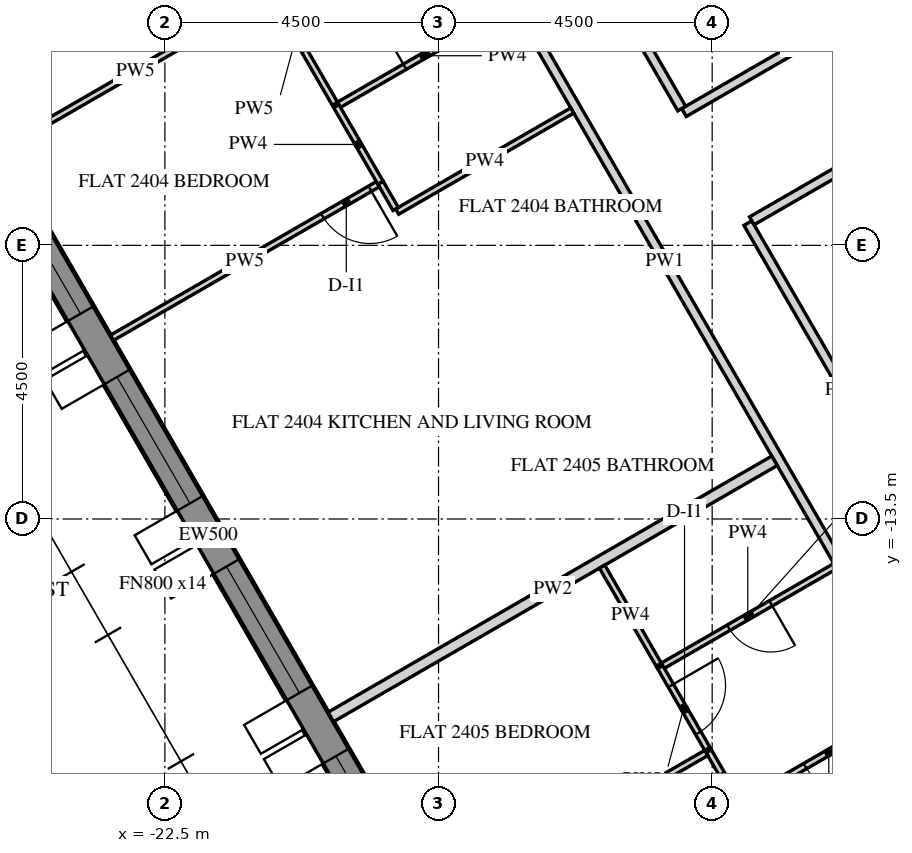
"""IFC4 building model, lengths in metres.
Left out: names, types, materials, properties, quantities, classifications, styles, units other than length and angle.
Written with IfcOpenShell. Run it as: python <this file> out.ifc"""

import sys

from ifc_helpers import new_model, si_unit, direction, frame, frame_2d, origin, place, context, subcontext, project, spatial, polyline, rectangle, outline, extrude, element, fill, save


model = new_model("IFC4")
c1 = context("Model", 3, precision=1e-05, world=origin(), true_north=direction((0.0, 1.0)))
c2 = subcontext(c1, "Body", "Model", "MODEL_VIEW")
j1 = project(units=[si_unit("LENGTHUNIT", "METRE"), si_unit("PLANEANGLEUNIT", "RADIAN")], contexts=[c1])
p1 = place(None, origin())
s1 = spatial("IfcSite", under=j1, at=p1, CompositionType="ELEMENT")
p2 = place(p1, origin())
s2 = spatial("IfcBuilding", under=s1, at=p2, CompositionType="ELEMENT")
p3 = place(p2, frame((0.0, 0.0, 303.0)))
s3 = spatial("IfcBuildingStorey", under=s2, at=p3, CompositionType="ELEMENT", Elevation=303.0)
p4 = place(p3, frame((-28.149, -2.745, -0.15), z_axis=(0.0, 0.0, 1.0), x_axis=(0.500003737743, -0.866023245787, 0.0)))
e1 = element("IfcWall", 1, at=p4, inside=s3, PredefinedType="SOLIDWALL", context=c2, shape_type="SweptSolid", body=[
    extrude(outline(polyline([(-0.021, -0.25), (25.468, -0.25), (25.421, 0.25), (0.021, 0.25), (-0.021, -0.25)])), origin(), (0.0, 0.0, 1.0), 3.9),
])
p5 = place(p4, frame((2.522, 0.0, 0.75)))
e2 = element("IfcOpeningElement", 2, at=p5, cuts=e1, PredefinedType="OPENING", context=c2, shape_type="SweptSolid", body=[
    extrude(rectangle(XDim=2.4, YDim=2.7, at=frame_2d((1.2, 1.35))), frame((0.0, 0.26, 0.0), z_axis=(0.0, -1.0, 0.0), x_axis=(1.0, 0.0, 0.0)), (0.0, 0.0, 1.0), 0.52),
])
p6 = place(p4, frame((6.122, 0.0, 0.75)))
e3 = element("IfcOpeningElement", 3, at=p6, cuts=e1, PredefinedType="OPENING", context=c2, shape_type="SweptSolid", body=[
    extrude(rectangle(XDim=2.4, YDim=2.7, at=frame_2d((1.2, 1.35))), frame((0.0, 0.26, 0.0), z_axis=(0.0, -1.0, 0.0), x_axis=(1.0, 0.0, 0.0)), (0.0, 0.0, 1.0), 0.52),
])
p7 = place(p4, frame((9.722, 0.0, 0.75)))
e4 = element("IfcOpeningElement", 4, at=p7, cuts=e1, PredefinedType="OPENING", context=c2, shape_type="SweptSolid", body=[
    extrude(rectangle(XDim=2.4, YDim=2.7, at=frame_2d((1.2, 1.35))), frame((0.0, 0.26, 0.0), z_axis=(0.0, -1.0, 0.0), x_axis=(1.0, 0.0, 0.0)), (0.0, 0.0, 1.0), 0.52),
])
p8 = place(p4, frame((13.323, 0.0, 0.75)))
e5 = element("IfcOpeningElement", 5, at=p8, cuts=e1, PredefinedType="OPENING", context=c2, shape_type="SweptSolid", body=[
    extrude(rectangle(XDim=2.4, YDim=2.7, at=frame_2d((1.2, 1.35))), frame((0.0, 0.26, 0.0), z_axis=(0.0, -1.0, 0.0), x_axis=(1.0, 0.0, 0.0)), (0.0, 0.0, 1.0), 0.52),
])
p9 = place(p4, frame((16.922, 0.0, 0.75)))
e6 = element("IfcOpeningElement", 6, at=p9, cuts=e1, PredefinedType="OPENING", context=c2, shape_type="SweptSolid", body=[
    extrude(rectangle(XDim=2.4, YDim=2.7, at=frame_2d((1.2, 1.35))), frame((0.0, 0.26, 0.0), z_axis=(0.0, -1.0, 0.0), x_axis=(1.0, 0.0, 0.0)), (0.0, 0.0, 1.0), 0.52),
])
p10 = place(p4, frame((20.522, 0.0, 0.75)))
e7 = element("IfcOpeningElement", 7, at=p10, cuts=e1, PredefinedType="OPENING", context=c2, shape_type="SweptSolid", body=[
    extrude(rectangle(XDim=2.4, YDim=2.7, at=frame_2d((1.2, 1.35))), frame((0.0, 0.26, 0.0), z_axis=(0.0, -1.0, 0.0), x_axis=(1.0, 0.0, 0.0)), (0.0, 0.0, 1.0), 0.52),
])
p11 = place(p3, frame((-12.471, 0.0, -0.15), z_axis=(0.0, 0.0, 1.0), x_axis=(0.499996419489, -0.866027470984, 0.0)))
e8 = element("IfcWall", 8, at=p11, inside=s3, PredefinedType="SHEAR", context=c2, shape_type="SweptSolid", body=[
    extrude(outline(polyline([(-0.115, -0.2), (12.586, -0.2), (12.355, 0.2), (0.115, 0.2), (-0.115, -0.2)])), origin(), (0.0, 0.0, 1.0), 3.9),
])
p12 = place(p11, frame((5.306, 0.0, 0.15)))
e9 = element("IfcOpeningElement", 9, at=p12, cuts=e8, PredefinedType="OPENING", context=c2, shape_type="SweptSolid", body=[
    extrude(rectangle(XDim=1.8, YDim=2.4, at=frame_2d((0.9, 1.2))), frame((0.0, 0.21, 0.0), z_axis=(0.0, -1.0, 0.0), x_axis=(1.0, 0.0, 0.0)), (0.0, 0.0, 1.0), 0.42),
])
p13 = place(p3, frame((-18.036, -2.761, 0.0), z_axis=(0.0, 0.0, 1.0), x_axis=(0.499996279807, -0.866027551628, 0.0)))
e10 = element("IfcWall", 10, at=p13, inside=s3, PredefinedType="PARTITIONING", context=c2, shape_type="SweptSolid", body=[
    extrude(rectangle(XDim=15.024, YDim=0.15, at=frame_2d((7.512, 0.0))), origin(), (0.0, 0.0, 1.0), 2.988),
])
p14 = place(p13, frame((0.8, 0.0, 0.0)))
e11 = element("IfcOpeningElement", 11, at=p14, cuts=e10, PredefinedType="OPENING", context=c2, shape_type="SweptSolid", body=[
    extrude(rectangle(XDim=1.0, YDim=2.1, at=frame_2d((0.5, 1.05))), frame((0.0, 0.085, 0.0), z_axis=(0.0, -1.0, 0.0), x_axis=(1.0, 0.0, 0.0)), (0.0, 0.0, 1.0), 0.17),
])
p15 = place(p13, frame((13.874, 0.0, 0.0)))
e12 = element("IfcOpeningElement", 12, at=p15, cuts=e10, PredefinedType="OPENING", context=c2, shape_type="SweptSolid", body=[
    extrude(rectangle(XDim=1.0, YDim=2.1, at=frame_2d((0.5, 1.05))), frame((0.0, 0.085, 0.0), z_axis=(0.0, -1.0, 0.0), x_axis=(1.0, 0.0, 0.0)), (0.0, 0.0, 1.0), 0.17),
])
p16 = place(p3, frame((-10.066, -4.566, 0.0), z_axis=(0.0, 0.0, 1.0), x_axis=(-0.866031096941, -0.499990139034, 0.0)))
e13 = element("IfcWall", 13, at=p16, inside=s3, PredefinedType="PARTITIONING", context=c2, shape_type="SweptSolid", body=[
    extrude(rectangle(XDim=4.5, YDim=0.15, at=frame_2d((2.25, 0.0))), origin(), (0.0, 0.0, 1.0), 2.988),
])
p17 = place(p3, frame((-14.0, -6.751, 0.0), z_axis=(0.0, 0.0, 1.0), x_axis=(-0.500008739126, 0.866020358189, 0.0)))
e14 = element("IfcWall", 14, at=p17, inside=s3, PredefinedType="PARTITIONING", context=c2, shape_type="SweptSolid", body=[
    extrude(rectangle(XDim=4.675, YDim=0.15, at=frame_2d((2.338, 0.0))), origin(), (0.0, 0.0, 1.0), 2.988),
])
p18 = place(p17, frame((1.888, 0.0, 0.0)))
e15 = element("IfcOpeningElement", 15, at=p18, cuts=e14, PredefinedType="OPENING", context=c2, shape_type="SweptSolid", body=[
    extrude(rectangle(XDim=0.9, YDim=2.1, at=frame_2d((0.45, 1.05))), frame((0.0, 0.085, 0.0), z_axis=(0.0, -1.0, 0.0), x_axis=(1.0, 0.0, 0.0)), (0.0, 0.0, 1.0), 0.17),
])
p19 = place(p3, frame((-9.735, -14.138, 0.0), z_axis=(0.0, 0.0, 1.0), x_axis=(-0.500018385592, 0.866014788598, 0.0)))
e16 = element("IfcWall", 16, at=p19, inside=s3, PredefinedType="PARTITIONING", context=c2, shape_type="SweptSolid", body=[
    extrude(rectangle(XDim=6.356, YDim=0.15, at=frame_2d((3.178, 0.0))), origin(), (0.0, 0.0, 1.0), 2.988),
])
p20 = place(p3, frame((-12.848, -8.597, 0.0), z_axis=(0.0, 0.0, 1.0), x_axis=(0.866017452598, 0.500013771606, 0.0)))
e17 = element("IfcWall", 17, at=p20, inside=s3, PredefinedType="PARTITIONING", context=c2, shape_type="SweptSolid", body=[
    extrude(rectangle(XDim=4.425, YDim=0.15, at=frame_2d((2.213, 0.0))), origin(), (0.0, 0.0, 1.0), 2.988),
])
p21 = place(p3, frame((-15.801, -6.782, 0.0), z_axis=(0.0, 0.0, 1.0), x_axis=(-0.866033959199, -0.499985181294, 0.0)))
e18 = element("IfcWall", 18, at=p21, inside=s3, PredefinedType="PARTITIONING", context=c2, shape_type="SweptSolid", body=[
    extrude(rectangle(XDim=3.325, YDim=0.1, at=frame_2d((1.662, 0.0))), origin(), (0.0, 0.0, 1.0), 2.988),
])
p22 = place(p3, frame((-18.705, -8.402, 0.0), z_axis=(0.0, 0.0, 1.0), x_axis=(-0.499863173377, 0.866104386261, 0.0)))
e19 = element("IfcWall", 19, at=p22, inside=s3, PredefinedType="PARTITIONING", context=c2, shape_type="SweptSolid", body=[
    extrude(rectangle(XDim=0.501, YDim=0.1, at=frame_2d((0.25, 0.0))), origin(), (0.0, 0.0, 1.0), 2.988),
])
p23 = place(p3, frame((-18.998, -7.995, 0.0), z_axis=(0.0, 0.0, 1.0), x_axis=(-0.866039067339, -0.499976333282, 0.0)))
e20 = element("IfcWall", 20, at=p23, inside=s3, PredefinedType="PARTITIONING", context=c2, shape_type="SweptSolid", body=[
    extrude(rectangle(XDim=5.05, YDim=0.1, at=frame_2d((2.525, 0.0))), origin(), (0.0, 0.0, 1.0), 2.988),
])
p24 = place(p23, frame((0.15, 0.0, 0.0)))
e21 = element("IfcOpeningElement", 21, at=p24, cuts=e20, PredefinedType="OPENING", context=c2, shape_type="SweptSolid", body=[
    extrude(rectangle(XDim=0.9, YDim=2.1, at=frame_2d((0.45, 1.05))), frame((0.0, 0.06, 0.0), z_axis=(0.0, -1.0, 0.0), x_axis=(1.0, 0.0, 0.0)), (0.0, 0.0, 1.0), 0.12),
])
p25 = place(p3, frame((-19.771, -16.755, 0.0), z_axis=(0.0, 0.0, 1.0), x_axis=(0.866026819143, 0.499997548519, 0.0)))
e22 = element("IfcWall", 22, at=p25, inside=s3, PredefinedType="PARTITIONING", context=c2, shape_type="SweptSolid", body=[
    extrude(rectangle(XDim=8.425, YDim=0.18, at=frame_2d((4.212, 0.0))), origin(), (0.0, 0.0, 1.0), 2.988),
])
p26 = place(p3, frame((-19.68, -6.713, 0.0), z_axis=(0.0, 0.0, 1.0), x_axis=(0.866002163101, 0.500040251884, 0.0)))
e23 = element("IfcWall", 23, at=p26, inside=s3, PredefinedType="PARTITIONING", context=c2, shape_type="SweptSolid", body=[
    extrude(rectangle(XDim=3.325, YDim=0.1, at=frame_2d((1.663, 0.0))), origin(), (0.0, 0.0, 1.0), 2.988),
])
p27 = place(p26, frame((1.3, 0.0, 0.0)))
e24 = element("IfcOpeningElement", 24, at=p27, cuts=e23, PredefinedType="OPENING", context=c2, shape_type="SweptSolid", body=[
    extrude(rectangle(XDim=0.8, YDim=2.1, at=frame_2d((0.4, 1.05))), frame((0.0, 0.06, 0.0), z_axis=(0.0, -1.0, 0.0), x_axis=(1.0, 0.0, 0.0)), (0.0, 0.0, 1.0), 0.12),
])
p28 = place(p3, frame((-20.981, -4.459, 0.0), z_axis=(0.0, 0.0, 1.0), x_axis=(0.500056202316, -0.865992952931, 0.0)))
e25 = element("IfcWall", 25, at=p28, inside=s3, PredefinedType="PARTITIONING", context=c2, shape_type="SweptSolid", body=[
    extrude(rectangle(XDim=2.554, YDim=0.1, at=frame_2d((1.277, 0.0))), origin(), (0.0, 0.0, 1.0), 2.988),
])
p29 = place(p28, frame((0.653, 0.0, 0.0)))
e26 = element("IfcOpeningElement", 26, at=p29, cuts=e25, PredefinedType="OPENING", context=c2, shape_type="SweptSolid", body=[
    extrude(rectangle(XDim=0.9, YDim=2.1, at=frame_2d((0.45, 1.05))), frame((0.0, 0.06, 0.0), z_axis=(0.0, -1.0, 0.0), x_axis=(1.0, 0.0, 0.0)), (0.0, 0.0, 1.0), 0.12),
])
p30 = place(p3, frame((-19.681, -6.711, 0.0), z_axis=(0.0, 0.0, 1.0), x_axis=(0.499969679245, -0.866042908773, 0.0)))
e27 = element("IfcWall", 27, at=p30, inside=s3, PredefinedType="PARTITIONING", context=c2, shape_type="SweptSolid", body=[
    extrude(rectangle(XDim=1.453, YDim=0.1, at=frame_2d((0.727, 0.0))), origin(), (0.0, 0.0, 1.0), 2.988),
])
p31 = place(p3, frame((-25.171, -7.402, 0.0), z_axis=(0.0, 0.0, 1.0), x_axis=(0.866026981659, 0.499997267031, 0.0)))
e28 = element("IfcWall", 28, at=p31, inside=s3, PredefinedType="PARTITIONING", context=c2, shape_type="SweptSolid", body=[
    extrude(rectangle(XDim=5.05, YDim=0.1, at=frame_2d((2.525, 0.0))), origin(), (0.0, 0.0, 1.0), 2.988),
])
p32 = place(p31, frame((4.0, 0.0, 0.0)))
e29 = element("IfcOpeningElement", 29, at=p32, cuts=e28, PredefinedType="OPENING", context=c2, shape_type="SweptSolid", body=[
    extrude(rectangle(XDim=0.9, YDim=2.1, at=frame_2d((0.45, 1.05))), frame((0.0, 0.06, 0.0), z_axis=(0.0, -1.0, 0.0), x_axis=(1.0, 0.0, 0.0)), (0.0, 0.0, 1.0), 0.12),
])
p33 = place(p3, frame((-8.789, -15.726, 0.0), z_axis=(0.0, 0.0, 1.0), x_axis=(-0.866010575439, -0.500025682568, 0.0)))
e30 = element("IfcWall", 30, at=p33, inside=s3, PredefinedType="PARTITIONING", context=c2, shape_type="SweptSolid", body=[
    extrude(rectangle(XDim=4.925, YDim=0.1, at=frame_2d((2.462, 0.0))), origin(), (0.0, 0.0, 1.0), 2.988),
])
p34 = place(p33, frame((2.775, 0.0, 0.0)))
e31 = element("IfcOpeningElement", 31, at=p34, cuts=e30, PredefinedType="OPENING", context=c2, shape_type="SweptSolid", body=[
    extrude(rectangle(XDim=0.9, YDim=2.1, at=frame_2d((0.45, 1.05))), frame((0.0, 0.06, 0.0), z_axis=(0.0, -1.0, 0.0), x_axis=(1.0, 0.0, 0.0)), (0.0, 0.0, 1.0), 0.12),
])
p35 = place(p3, frame((-13.08, -18.146, 0.0), z_axis=(0.0, 0.0, 1.0), x_axis=(-0.49986306505, 0.866104448781, 0.0)))
e32 = element("IfcWall", 32, at=p35, inside=s3, PredefinedType="PARTITIONING", context=c2, shape_type="SweptSolid", body=[
    extrude(rectangle(XDim=0.952, YDim=0.1, at=frame_2d((0.476, 0.0))), origin(), (0.0, 0.0, 1.0), 2.988),
])
p36 = place(p3, frame((-13.598, -17.348, 0.0), z_axis=(0.0, 0.0, 1.0), x_axis=(-0.866026981659, -0.499997267031, 0.0)))
e33 = element("IfcWall", 33, at=p36, inside=s3, PredefinedType="PARTITIONING", context=c2, shape_type="SweptSolid", body=[
    extrude(rectangle(XDim=5.05, YDim=0.1, at=frame_2d((2.525, 0.0))), origin(), (0.0, 0.0, 1.0), 2.988),
])
p37 = place(p3, frame((-11.475, -14.275, 0.0), z_axis=(0.0, 0.0, 1.0), x_axis=(-0.866002163101, -0.500040251884, 0.0)))
e34 = element("IfcWall", 34, at=p37, inside=s3, PredefinedType="PARTITIONING", context=c2, shape_type="SweptSolid", body=[
    extrude(rectangle(XDim=3.325, YDim=0.1, at=frame_2d((1.663, 0.0))), origin(), (0.0, 0.0, 1.0), 2.988),
])
p38 = place(p37, frame((1.225, 0.0, 0.0)))
e35 = element("IfcOpeningElement", 35, at=p38, cuts=e34, PredefinedType="OPENING", context=c2, shape_type="SweptSolid", body=[
    extrude(rectangle(XDim=0.8, YDim=2.1, at=frame_2d((0.4, 1.05))), frame((0.0, 0.06, 0.0), z_axis=(0.0, -1.0, 0.0), x_axis=(1.0, 0.0, 0.0)), (0.0, 0.0, 1.0), 0.12),
])
p39 = place(p3, frame((-14.355, -15.936, 0.0), z_axis=(0.0, 0.0, 1.0), x_axis=(0.499963041308, -0.866046740844, 0.0)))
e36 = element("IfcWall", 36, at=p39, inside=s3, PredefinedType="PARTITIONING", context=c2, shape_type="SweptSolid", body=[
    extrude(rectangle(XDim=1.552, YDim=0.1, at=frame_2d((0.776, 0.0))), origin(), (0.0, 0.0, 1.0), 2.988),
])
p40 = place(p39, frame((0.352, 0.0, 0.0)))
e37 = element("IfcOpeningElement", 37, at=p40, cuts=e36, PredefinedType="OPENING", context=c2, shape_type="SweptSolid", body=[
    extrude(rectangle(XDim=0.9, YDim=2.1, at=frame_2d((0.45, 1.05))), frame((0.0, 0.06, 0.0), z_axis=(0.0, -1.0, 0.0), x_axis=(1.0, 0.0, 0.0)), (0.0, 0.0, 1.0), 0.12),
])
p41 = place(p3, frame((-15.31, -14.283, 0.0), z_axis=(0.0, 0.0, 1.0), x_axis=(0.500059143742, -0.865991254436, 0.0)))
e38 = element("IfcWall", 38, at=p41, inside=s3, PredefinedType="PARTITIONING", context=c2, shape_type="SweptSolid", body=[
    extrude(rectangle(XDim=1.862, YDim=0.1, at=frame_2d((0.931, 0.0))), origin(), (0.0, 0.0, 1.0), 2.988),
])
p42 = place(p6, frame((0.0, 0.18, 0.0)))
e39 = element("IfcWindow", 39, at=p42, inside=s3, PartitioningType="DOUBLE_PANEL_VERTICAL", PredefinedType="WINDOW", context=c2, shape_type="SweptSolid", body=[
    extrude(rectangle(XDim=2.4, YDim=2.7, at=frame_2d((1.2, 1.35))), frame((0.0, 0.03, 0.0), z_axis=(0.0, -1.0, 0.0), x_axis=(1.0, 0.0, 0.0)), (0.0, 0.0, 1.0), 0.06),
])
fill(e3, e39)
p43 = place(p7, frame((0.0, 0.18, 0.0)))
e40 = element("IfcWindow", 40, at=p43, inside=s3, PartitioningType="DOUBLE_PANEL_VERTICAL", PredefinedType="WINDOW", context=c2, shape_type="SweptSolid", body=[
    extrude(rectangle(XDim=2.4, YDim=2.7, at=frame_2d((1.2, 1.35))), frame((0.0, 0.03, 0.0), z_axis=(0.0, -1.0, 0.0), x_axis=(1.0, 0.0, 0.0)), (0.0, 0.0, 1.0), 0.06),
])
fill(e4, e40)
p44 = place(p8, frame((0.0, 0.18, 0.0)))
e41 = element("IfcWindow", 41, at=p44, inside=s3, PartitioningType="DOUBLE_PANEL_VERTICAL", PredefinedType="WINDOW", context=c2, shape_type="SweptSolid", body=[
    extrude(rectangle(XDim=2.4, YDim=2.7, at=frame_2d((1.2, 1.35))), frame((0.0, 0.03, 0.0), z_axis=(0.0, -1.0, 0.0), x_axis=(1.0, 0.0, 0.0)), (0.0, 0.0, 1.0), 0.06),
])
fill(e5, e41)
p45 = place(p9, frame((0.0, 0.18, 0.0)))
e42 = element("IfcWindow", 42, at=p45, inside=s3, PartitioningType="DOUBLE_PANEL_VERTICAL", PredefinedType="WINDOW", context=c2, shape_type="SweptSolid", body=[
    extrude(rectangle(XDim=2.4, YDim=2.7, at=frame_2d((1.2, 1.35))), frame((0.0, 0.03, 0.0), z_axis=(0.0, -1.0, 0.0), x_axis=(1.0, 0.0, 0.0)), (0.0, 0.0, 1.0), 0.06),
])
fill(e6, e42)
p46 = place(p27, origin())
e43 = element("IfcDoor", 43, at=p46, inside=s3, OperationType="SINGLE_SWING_LEFT", PredefinedType="DOOR", context=c2, shape_type="SweptSolid", body=[
    extrude(rectangle(XDim=0.8, YDim=2.1, at=frame_2d((0.4, 1.05))), frame((0.0, 0.025, 0.0), z_axis=(0.0, -1.0, 0.0), x_axis=(1.0, 0.0, 0.0)), (0.0, 0.0, 1.0), 0.05),
])
fill(e24, e43)
p47 = place(p24, origin())
e44 = element("IfcDoor", 44, at=p47, inside=s3, OperationType="SINGLE_SWING_RIGHT", PredefinedType="DOOR", context=c2, shape_type="SweptSolid", body=[
    extrude(rectangle(XDim=0.9, YDim=2.1, at=frame_2d((0.45, 1.05))), frame((0.0, 0.025, 0.0), z_axis=(0.0, -1.0, 0.0), x_axis=(1.0, 0.0, 0.0)), (0.0, 0.0, 1.0), 0.05),
])
fill(e21, e44)
p48 = place(p38, origin())
e45 = element("IfcDoor", 45, at=p48, inside=s3, OperationType="SINGLE_SWING_RIGHT", PredefinedType="DOOR", context=c2, shape_type="SweptSolid", body=[
    extrude(rectangle(XDim=0.8, YDim=2.1, at=frame_2d((0.4, 1.05))), frame((0.0, 0.025, 0.0), z_axis=(0.0, -1.0, 0.0), x_axis=(1.0, 0.0, 0.0)), (0.0, 0.0, 1.0), 0.05),
])
fill(e35, e45)
p49 = place(p34, origin())
e46 = element("IfcDoor", 46, at=p49, inside=s3, OperationType="SINGLE_SWING_LEFT", PredefinedType="DOOR", context=c2, shape_type="SweptSolid", body=[
    extrude(rectangle(XDim=0.9, YDim=2.1, at=frame_2d((0.45, 1.05))), frame((0.0, 0.025, 0.0), z_axis=(0.0, -1.0, 0.0), x_axis=(1.0, 0.0, 0.0)), (0.0, 0.0, 1.0), 0.05),
])
fill(e31, e46)
p50 = place(p40, origin())
e47 = element("IfcDoor", 47, at=p50, inside=s3, OperationType="SINGLE_SWING_LEFT", PredefinedType="DOOR", context=c2, shape_type="SweptSolid", body=[
    extrude(rectangle(XDim=0.9, YDim=2.1, at=frame_2d((0.45, 1.05))), frame((0.0, 0.025, 0.0), z_axis=(0.0, -1.0, 0.0), x_axis=(1.0, 0.0, 0.0)), (0.0, 0.0, 1.0), 0.05),
])
fill(e37, e47)
save(model, sys.argv[1])
